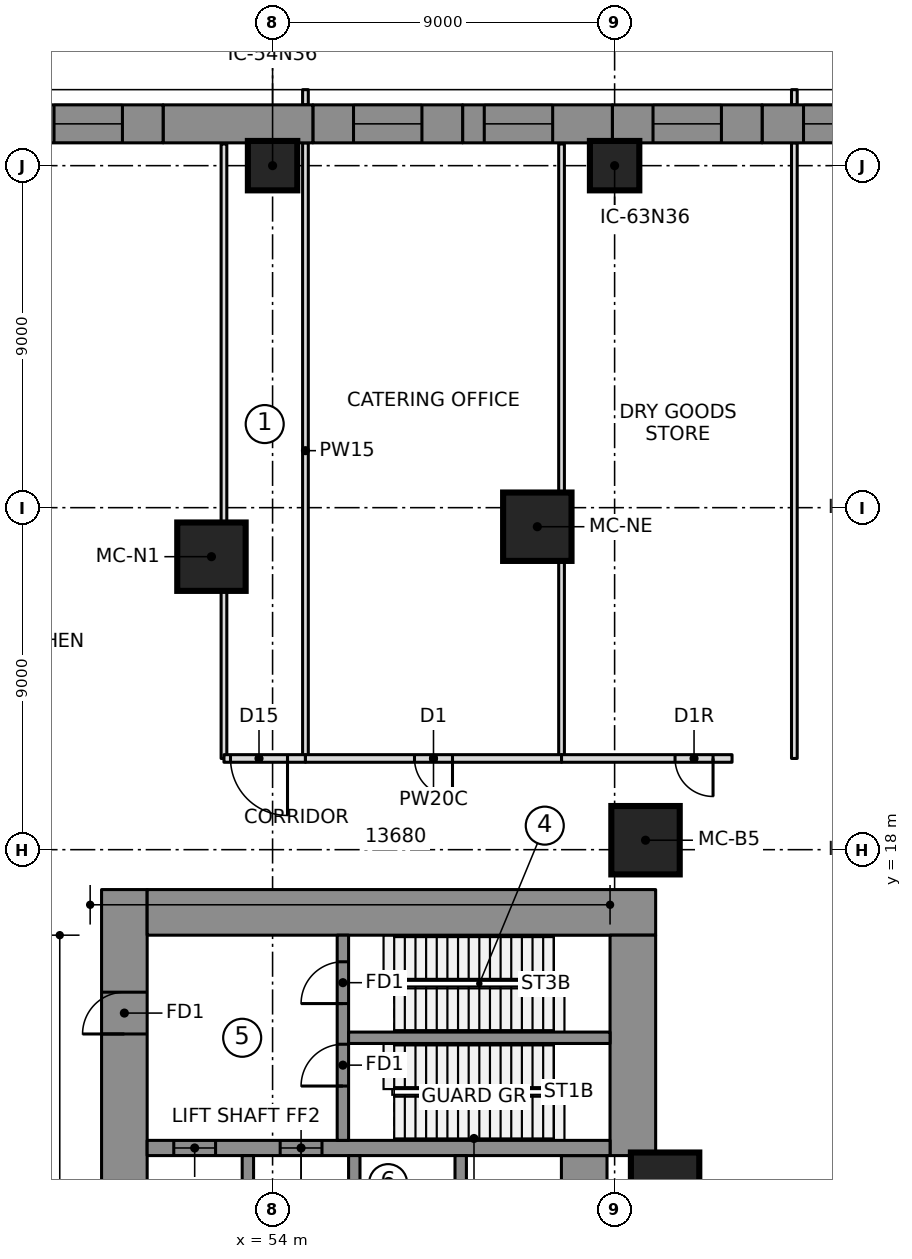
"""IFC4 building model, lengths in metres.
Left out: names, types, materials, properties, quantities, classifications, styles, units other than length and angle.
Written with IfcOpenShell. Run it as: python <this file> out.ifc"""

import sys

from ifc_helpers import new_model, si_unit, direction, frame, frame_2d, origin, origin_2d, place, context, subcontext, project, spatial, polyline, rectangle, outline, extrude, element, fill, save


model = new_model("IFC4")
c1 = context("Model", 3, precision=1e-05, world=origin(), true_north=direction((0.0, 1.0)))
c2 = subcontext(c1, "Body", "Model", "MODEL_VIEW")
j1 = project(units=[si_unit("LENGTHUNIT", "METRE"), si_unit("PLANEANGLEUNIT", "RADIAN")], contexts=[c1])
p1 = place(None, origin())
s1 = spatial("IfcSite", under=j1, at=p1, CompositionType="ELEMENT")
p2 = place(p1, origin())
s2 = spatial("IfcBuilding", under=s1, at=p2, CompositionType="ELEMENT")
p3 = place(p2, frame((0.0, 0.0, 13.5)))
s3 = spatial("IfcBuildingStorey", under=s2, at=p3, CompositionType="ELEMENT", Elevation=13.5)
p4 = place(p3, frame((50.1, 6.65, 0.0), z_axis=(0.0, 0.0, 1.0), x_axis=(0.0, 1.0, 0.0)))
e1 = element("IfcWall", 1, at=p4, inside=s3, PredefinedType="SHEAR", context=c2, shape_type="SweptSolid", body=[
    extrude(rectangle(XDim=10.3, YDim=1.2, at=frame_2d((5.15, 0.0))), origin(), (0.0, 0.0, 1.0), 5.5),
])
p5 = place(p4, frame((6.5, 0.0, 0.0)))
e2 = element("IfcOpeningElement", 2, at=p5, cuts=e1, PredefinedType="OPENING", context=c2, shape_type="SweptSolid", body=[
    extrude(rectangle(XDim=1.1, YDim=2.1, at=frame_2d((0.55, 1.05))), frame((0.0, 0.61, 0.0), z_axis=(0.0, -1.0, 0.0), x_axis=(1.0, 0.0, 0.0)), (0.0, 0.0, 1.0), 1.22),
])
p6 = place(p3, frame((50.7, 16.35, 0.0), z_axis=(0.0, 0.0, 1.0), x_axis=(1.0, 0.0, 0.0)))
e3 = element("IfcWall", 3, at=p6, inside=s3, PredefinedType="SHEAR", context=c2, shape_type="SweptSolid", body=[
    extrude(rectangle(XDim=13.38, YDim=1.2, at=frame_2d((6.69, 0.0))), origin(), (0.0, 0.0, 1.0), 5.5),
])
p7 = place(p3, frame((63.48, 9.95, 0.0), z_axis=(0.0, 0.0, 1.0), x_axis=(0.0, 1.0, 0.0)))
e4 = element("IfcWall", 4, at=p7, inside=s3, PredefinedType="SHEAR", context=c2, shape_type="SweptSolid", body=[
    extrude(rectangle(XDim=5.8, YDim=1.2, at=frame_2d((2.9, 0.0))), origin(), (0.0, 0.0, 1.0), 5.5),
])
p8 = place(p3, frame((62.2, -9.95, 0.0), z_axis=(0.0, 0.0, 1.0), x_axis=(0.0, 1.0, 0.0)))
e5 = element("IfcWall", 5, at=p8, inside=s3, PredefinedType="SHEAR", context=c2, shape_type="SweptSolid", body=[
    extrude(rectangle(XDim=19.9, YDim=1.2, at=frame_2d((9.95, 0.0))), origin(), (0.0, 0.0, 1.0), 5.5),
])
p9 = place(p3, frame((50.7, 10.15, 0.0), z_axis=(0.0, 0.0, 1.0), x_axis=(1.0, 0.0, 0.0)))
e6 = element("IfcWall", 6, at=p9, inside=s3, PredefinedType="SHEAR", context=c2, shape_type="SweptSolid", body=[
    extrude(rectangle(XDim=12.18, YDim=0.4, at=frame_2d((6.09, 0.0))), origin(), (0.0, 0.0, 1.0), 5.5),
])
p10 = place(p9, frame((0.7, 0.0, 0.0)))
e7 = element("IfcOpeningElement", 7, at=p10, cuts=e6, PredefinedType="OPENING", context=c2, shape_type="SweptSolid", body=[
    extrude(rectangle(XDim=1.1, YDim=2.1, at=frame_2d((0.55, 1.05))), frame((0.0, 0.21, 0.0), z_axis=(0.0, -1.0, 0.0), x_axis=(1.0, 0.0, 0.0)), (0.0, 0.0, 1.0), 0.42),
])
p11 = place(p9, frame((3.5, 0.0, 0.0)))
e8 = element("IfcOpeningElement", 8, at=p11, cuts=e6, PredefinedType="OPENING", context=c2, shape_type="SweptSolid", body=[
    extrude(rectangle(XDim=1.1, YDim=2.1, at=frame_2d((0.55, 1.05))), frame((0.0, 0.21, 0.0), z_axis=(0.0, -1.0, 0.0), x_axis=(1.0, 0.0, 0.0)), (0.0, 0.0, 1.0), 0.42),
])
for number, where, z_axis, x_axis in (
    (9, (53.35, 6.95, 0.0), (0.0, 0.0, 1.0), (0.0, 1.0, 0.0)),
    (10, (56.15, 6.95, 0.0), (0.0, 0.0, 1.0), (0.0, 1.0, 0.0)),
    (11, (58.95, 6.95, 0.0), (0.0, 0.0, 1.0), (0.0, 1.0, 0.0)),
):
    element("IfcWall", number, at=place(p3, frame(where, z_axis=z_axis, x_axis=x_axis)), inside=s3, PredefinedType="SHEAR", context=c2, shape_type="SweptSolid", body=[
        extrude(rectangle(XDim=3.0, YDim=0.3, at=frame_2d((1.5, 0.0))), origin(), (0.0, 0.0, 1.0), 5.5),
    ])
p12 = place(p3, frame((55.85, 10.35, 0.0), z_axis=(0.0, 0.0, 1.0), x_axis=(0.0, 1.0, 0.0)))
e12 = element("IfcWall", 12, at=p12, inside=s3, PredefinedType="SHEAR", context=c2, shape_type="SweptSolid", body=[
    extrude(rectangle(XDim=5.4, YDim=0.3, at=frame_2d((2.7, 0.0))), origin(), (0.0, 0.0, 1.0), 5.5),
])
p13 = place(p12, frame((1.43, 0.0, 0.0)))
e13 = element("IfcOpeningElement", 13, at=p13, cuts=e12, PredefinedType="OPENING", context=c2, shape_type="SweptSolid", body=[
    extrude(rectangle(XDim=1.1, YDim=2.1, at=frame_2d((0.55, 1.05))), frame((0.0, 0.16, 0.0), z_axis=(0.0, -1.0, 0.0), x_axis=(1.0, 0.0, 0.0)), (0.0, 0.0, 1.0), 0.32),
])
p14 = place(p12, frame((3.6, 0.0, 0.0)))
e14 = element("IfcOpeningElement", 14, at=p14, cuts=e12, PredefinedType="OPENING", context=c2, shape_type="SweptSolid", body=[
    extrude(rectangle(XDim=1.1, YDim=2.1, at=frame_2d((0.55, 1.05))), frame((0.0, 0.16, 0.0), z_axis=(0.0, -1.0, 0.0), x_axis=(1.0, 0.0, 0.0)), (0.0, 0.0, 1.0), 0.32),
])
p15 = place(p3, frame((56.0, 13.05, 0.0), z_axis=(0.0, 0.0, 1.0), x_axis=(1.0, 0.0, 0.0)))
e15 = element("IfcWall", 15, at=p15, inside=s3, PredefinedType="SHEAR", context=c2, shape_type="SweptSolid", body=[
    extrude(rectangle(XDim=6.88, YDim=0.3, at=frame_2d((3.44, 0.0))), origin(), (0.0, 0.0, 1.0), 5.5),
])
for number, where, z_axis, x_axis in (
    (16, (64.328, 9.131, 0.0), (0.0, 0.0, 1.0), (1.0, 0.0, 0.0)),
    (17, (63.813, 18.249, 0.0), (0.0, 0.0, 1.0), (1.0, 0.0, 0.0)),
    (18, (60.966, 26.499, 0.0), (0.0, 0.0, 1.0), (1.0, 0.0, 0.0)),
    (19, (52.392, 25.71, 0.0), (0.0, 0.0, 1.0), (1.0, 0.0, 0.0)),
):
    element("IfcColumn", number, at=place(p3, frame(where, z_axis=z_axis, x_axis=x_axis)), inside=s3, PredefinedType="COLUMN", context=c2, shape_type="SweptSolid", body=[
        extrude(rectangle(XDim=1.8, YDim=1.8, at=origin_2d()), origin(), (0.0, 0.0, 1.0), 5.5),
    ])
for number, where, z_axis, x_axis in (
    (20, (54.0, 36.0, 0.0), (0.0, 0.0, 1.0), (1.0, 0.0, 0.0)),
    (21, (63.0, 36.0, 0.0), (0.0, 0.0, 1.0), (1.0, 0.0, 0.0)),
):
    element("IfcColumn", number, at=place(p3, frame(where, z_axis=z_axis, x_axis=x_axis)), inside=s3, PredefinedType="COLUMN", context=c2, shape_type="SweptSolid", body=[
        extrude(rectangle(XDim=1.3, YDim=1.3, at=origin_2d()), origin(), (0.0, 0.0, 1.0), 5.5),
    ])
p16 = place(p3, frame((70.821, 37.1, 0.0), z_axis=(0.0, 0.0, 1.0), x_axis=(-1.0, 0.0, 0.0)))
e22 = element("IfcWall", 22, at=p16, inside=s3, PredefinedType="NOTDEFINED", context=c2, shape_type="SweptSolid", body=[
    extrude(outline(polyline([(-0.1, -0.5), (3.94, -0.5), (3.94, 0.5), (0.1, 0.5), (-0.1, -0.5)])), origin(), (0.0, 0.0, 1.0), 5.2),
])
p17 = place(p16, frame((1.05, 0.0, 0.9)))
e23 = element("IfcOpeningElement", 23, at=p17, cuts=e22, PredefinedType="OPENING", context=c2, shape_type="SweptSolid", body=[
    extrude(rectangle(XDim=1.8, YDim=2.4, at=frame_2d((0.9, 1.2))), frame((0.0, 0.51, 0.0), z_axis=(0.0, -1.0, 0.0), x_axis=(1.0, 0.0, 0.0)), (0.0, 0.0, 1.0), 1.02),
])
p18 = place(p3, frame((66.881, 37.1, 0.0), z_axis=(0.0, 0.0, 1.0), x_axis=(-1.0, 0.0, 0.0)))
e24 = element("IfcWall", 24, at=p18, inside=s3, PredefinedType="NOTDEFINED", context=c2, shape_type="SweptSolid", body=[
    extrude(outline(polyline([(0.0, -0.5), (3.94, -0.5), (3.94, 0.5), (0.0, 0.5), (0.0, -0.5)])), origin(), (0.0, 0.0, 1.0), 5.2),
])
p19 = place(p18, frame((1.07, 0.0, 0.9)))
e25 = element("IfcOpeningElement", 25, at=p19, cuts=e24, PredefinedType="OPENING", context=c2, shape_type="SweptSolid", body=[
    extrude(rectangle(XDim=1.8, YDim=2.4, at=frame_2d((0.9, 1.2))), frame((0.0, 0.51, 0.0), z_axis=(0.0, -1.0, 0.0), x_axis=(1.0, 0.0, 0.0)), (0.0, 0.0, 1.0), 1.02),
])
p20 = place(p3, frame((62.94, 37.1, 0.0), z_axis=(0.0, 0.0, 1.0), x_axis=(-1.0, 0.0, 0.0)))
e26 = element("IfcWall", 26, at=p20, inside=s3, PredefinedType="NOTDEFINED", context=c2, shape_type="SweptSolid", body=[
    extrude(outline(polyline([(0.0, -0.5), (3.94, -0.5), (3.94, 0.5), (0.0, 0.5), (0.0, -0.5)])), origin(), (0.0, 0.0, 1.0), 5.2),
])
p21 = place(p20, frame((1.57, 0.0, 0.9)))
e27 = element("IfcOpeningElement", 27, at=p21, cuts=e26, PredefinedType="OPENING", context=c2, shape_type="SweptSolid", body=[
    extrude(rectangle(XDim=1.8, YDim=2.4, at=frame_2d((0.9, 1.2))), frame((0.0, 0.51, 0.0), z_axis=(0.0, -1.0, 0.0), x_axis=(1.0, 0.0, 0.0)), (0.0, 0.0, 1.0), 1.02),
])
p22 = place(p3, frame((59.0, 37.1, 0.0), z_axis=(0.0, 0.0, 1.0), x_axis=(-1.0, 0.0, 0.0)))
e28 = element("IfcWall", 28, at=p22, inside=s3, PredefinedType="NOTDEFINED", context=c2, shape_type="SweptSolid", body=[
    extrude(outline(polyline([(0.0, -0.5), (3.94, -0.5), (3.94, 0.5), (0.0, 0.5), (0.0, -0.5)])), origin(), (0.0, 0.0, 1.0), 5.2),
])
p23 = place(p22, frame((1.07, 0.0, 0.9)))
e29 = element("IfcOpeningElement", 29, at=p23, cuts=e28, PredefinedType="OPENING", context=c2, shape_type="SweptSolid", body=[
    extrude(rectangle(XDim=1.8, YDim=2.4, at=frame_2d((0.9, 1.2))), frame((0.0, 0.51, 0.0), z_axis=(0.0, -1.0, 0.0), x_axis=(1.0, 0.0, 0.0)), (0.0, 0.0, 1.0), 1.02),
])
p24 = place(p3, frame((55.06, 37.1, 0.0), z_axis=(0.0, 0.0, 1.0), x_axis=(-1.0, 0.0, 0.0)))
e30 = element("IfcWall", 30, at=p24, inside=s3, PredefinedType="NOTDEFINED", context=c2, shape_type="SweptSolid", body=[
    extrude(outline(polyline([(0.0, -0.5), (3.94, -0.5), (3.94, 0.5), (0.0, 0.5), (0.0, -0.5)])), origin(), (0.0, 0.0, 1.0), 5.2),
])
p25 = place(p3, frame((51.119, 37.1, 0.0), z_axis=(0.0, 0.0, 1.0), x_axis=(-1.0, 0.0, 0.0)))
e31 = element("IfcWall", 31, at=p25, inside=s3, PredefinedType="NOTDEFINED", context=c2, shape_type="SweptSolid", body=[
    extrude(outline(polyline([(0.0, -0.5), (4.04, -0.5), (3.841, 0.5), (0.0, 0.5), (0.0, -0.5)])), origin(), (0.0, 0.0, 1.0), 5.2),
])
p26 = place(p25, frame((1.07, 0.0, 0.9)))
e32 = element("IfcOpeningElement", 32, at=p26, cuts=e31, PredefinedType="OPENING", context=c2, shape_type="SweptSolid", body=[
    extrude(rectangle(XDim=1.8, YDim=2.4, at=frame_2d((0.9, 1.2))), frame((0.0, 0.51, 0.0), z_axis=(0.0, -1.0, 0.0), x_axis=(1.0, 0.0, 0.0)), (0.0, 0.0, 1.0), 1.02),
])
p27 = place(p3, frame((52.721, 20.4, 0.0), z_axis=(0.0, 0.0, 1.0), x_axis=(0.0, 1.0, 0.0)))
e33 = element("IfcWall", 33, at=p27, inside=s3, PredefinedType="PARTITIONING", context=c2, shape_type="SweptSolid", body=[
    extrude(rectangle(XDim=16.17, YDim=0.15, at=frame_2d((8.085, 0.0))), origin(), (0.0, 0.0, 1.0), 5.15),
])
p28 = place(p3, frame((54.865, 20.4, 0.0), z_axis=(0.0, 0.0, 1.0), x_axis=(0.0, 1.0, 0.0)))
e34 = element("IfcWall", 34, at=p28, inside=s3, PredefinedType="PARTITIONING", context=c2, shape_type="SweptSolid", body=[
    extrude(rectangle(XDim=16.2, YDim=0.15, at=frame_2d((8.1, 0.0))), origin(), (0.0, 0.0, 1.0), 5.15),
])
p29 = place(p3, frame((54.865, 37.6, 0.0), z_axis=(0.0, 0.0, 1.0), x_axis=(0.0, 1.0, 0.0)))
e35 = element("IfcWall", 35, at=p29, inside=s3, PredefinedType="PARTITIONING", context=c2, shape_type="SweptSolid", body=[
    extrude(rectangle(XDim=0.4, YDim=0.15, at=frame_2d((0.2, 0.0))), origin(), (0.0, 0.0, 1.0), 5.15),
])
p30 = place(p3, frame((61.604, 20.4, 0.0), z_axis=(0.0, 0.0, 1.0), x_axis=(0.0, 1.0, 0.0)))
e36 = element("IfcWall", 36, at=p30, inside=s3, PredefinedType="PARTITIONING", context=c2, shape_type="SweptSolid", body=[
    extrude(rectangle(XDim=16.17, YDim=0.15, at=frame_2d((8.085, 0.0))), origin(), (0.0, 0.0, 1.0), 5.15),
])
p31 = place(p3, frame((67.73, 20.4, 0.0), z_axis=(0.0, 0.0, 1.0), x_axis=(0.0, 1.0, 0.0)))
e37 = element("IfcWall", 37, at=p31, inside=s3, PredefinedType="PARTITIONING", context=c2, shape_type="SweptSolid", body=[
    extrude(rectangle(XDim=16.2, YDim=0.15, at=frame_2d((8.1, 0.0))), origin(), (0.0, 0.0, 1.0), 5.15),
])
p32 = place(p3, frame((67.73, 37.6, 0.0), z_axis=(0.0, 0.0, 1.0), x_axis=(0.0, 1.0, 0.0)))
e38 = element("IfcWall", 38, at=p32, inside=s3, PredefinedType="PARTITIONING", context=c2, shape_type="SweptSolid", body=[
    extrude(rectangle(XDim=0.4, YDim=0.15, at=frame_2d((0.2, 0.0))), origin(), (0.0, 0.0, 1.0), 5.15),
])
p33 = place(p3, frame((54.865, 20.4, 0.0), z_axis=(0.0, 0.0, 1.0), x_axis=(-1.0, 0.0, 0.0)))
e39 = element("IfcWall", 39, at=p33, inside=s3, PredefinedType="PARTITIONING", context=c2, shape_type="SweptSolid", body=[
    extrude(rectangle(XDim=2.144, YDim=0.2, at=frame_2d((1.072, 0.0))), origin(), (0.0, 0.0, 1.0), 5.15),
])
p34 = place(p33, frame((0.472, 0.0, 0.0)))
e40 = element("IfcOpeningElement", 40, at=p34, cuts=e39, PredefinedType="OPENING", context=c2, shape_type="SweptSolid", body=[
    extrude(rectangle(XDim=1.5, YDim=2.1, at=frame_2d((0.75, 1.05))), frame((0.0, 0.11, 0.0), z_axis=(0.0, -1.0, 0.0), x_axis=(1.0, 0.0, 0.0)), (0.0, 0.0, 1.0), 0.22),
])
p35 = place(p3, frame((61.604, 20.4, 0.0), z_axis=(0.0, 0.0, 1.0), x_axis=(-1.0, 0.0, 0.0)))
e41 = element("IfcWall", 41, at=p35, inside=s3, PredefinedType="PARTITIONING", context=c2, shape_type="SweptSolid", body=[
    extrude(rectangle(XDim=6.739, YDim=0.2, at=frame_2d((3.369, 0.0))), origin(), (0.0, 0.0, 1.0), 5.15),
])
p36 = place(p35, frame((2.869, 0.0, 0.0)))
e42 = element("IfcOpeningElement", 42, at=p36, cuts=e41, PredefinedType="OPENING", context=c2, shape_type="SweptSolid", body=[
    extrude(rectangle(XDim=1.0, YDim=2.1, at=frame_2d((0.5, 1.05))), frame((0.0, 0.11, 0.0), z_axis=(0.0, -1.0, 0.0), x_axis=(1.0, 0.0, 0.0)), (0.0, 0.0, 1.0), 0.22),
])
p37 = place(p3, frame((66.09, 20.4, 0.0), z_axis=(0.0, 0.0, 1.0), x_axis=(-1.0, 0.0, 0.0)))
e43 = element("IfcWall", 43, at=p37, inside=s3, PredefinedType="PARTITIONING", context=c2, shape_type="SweptSolid", body=[
    extrude(rectangle(XDim=4.487, YDim=0.2, at=frame_2d((2.243, 0.0))), origin(), (0.0, 0.0, 1.0), 5.15),
])
p38 = place(p37, frame((0.5, 0.0, 0.0)))
e44 = element("IfcOpeningElement", 44, at=p38, cuts=e43, PredefinedType="OPENING", context=c2, shape_type="SweptSolid", body=[
    extrude(rectangle(XDim=1.0, YDim=2.1, at=frame_2d((0.5, 1.05))), frame((0.0, 0.11, 0.0), z_axis=(0.0, -1.0, 0.0), x_axis=(1.0, 0.0, 0.0)), (0.0, 0.0, 1.0), 0.22),
])
p39 = place(p17, origin())
e45 = element("IfcWindow", 45, at=p39, inside=s3, PartitioningType="SINGLE_PANEL", PredefinedType="WINDOW", context=c2, shape_type="SweptSolid", body=[
    extrude(rectangle(XDim=1.8, YDim=2.4, at=frame_2d((0.9, 1.2))), frame((0.0, 0.5, 0.0), z_axis=(0.0, -1.0, 0.0), x_axis=(1.0, 0.0, 0.0)), (0.0, 0.0, 1.0), 0.06),
])
fill(e23, e45)
p40 = place(p19, origin())
e46 = element("IfcWindow", 46, at=p40, inside=s3, PartitioningType="SINGLE_PANEL", PredefinedType="WINDOW", context=c2, shape_type="SweptSolid", body=[
    extrude(rectangle(XDim=1.8, YDim=2.4, at=frame_2d((0.9, 1.2))), frame((0.0, 0.5, 0.0), z_axis=(0.0, -1.0, 0.0), x_axis=(1.0, 0.0, 0.0)), (0.0, 0.0, 1.0), 0.06),
])
fill(e25, e46)
p41 = place(p21, origin())
e47 = element("IfcWindow", 47, at=p41, inside=s3, PartitioningType="SINGLE_PANEL", PredefinedType="WINDOW", context=c2, shape_type="SweptSolid", body=[
    extrude(rectangle(XDim=1.8, YDim=2.4, at=frame_2d((0.9, 1.2))), frame((0.0, 0.5, 0.0), z_axis=(0.0, -1.0, 0.0), x_axis=(1.0, 0.0, 0.0)), (0.0, 0.0, 1.0), 0.06),
])
fill(e27, e47)
p42 = place(p23, origin())
e48 = element("IfcWindow", 48, at=p42, inside=s3, PartitioningType="SINGLE_PANEL", PredefinedType="WINDOW", context=c2, shape_type="SweptSolid", body=[
    extrude(rectangle(XDim=1.8, YDim=2.4, at=frame_2d((0.9, 1.2))), frame((0.0, 0.5, 0.0), z_axis=(0.0, -1.0, 0.0), x_axis=(1.0, 0.0, 0.0)), (0.0, 0.0, 1.0), 0.06),
])
fill(e29, e48)
p43 = place(p26, origin())
e49 = element("IfcWindow", 49, at=p43, inside=s3, PartitioningType="SINGLE_PANEL", PredefinedType="WINDOW", context=c2, shape_type="SweptSolid", body=[
    extrude(rectangle(XDim=1.8, YDim=2.4, at=frame_2d((0.9, 1.2))), frame((0.0, 0.5, 0.0), z_axis=(0.0, -1.0, 0.0), x_axis=(1.0, 0.0, 0.0)), (0.0, 0.0, 1.0), 0.06),
])
fill(e32, e49)
p44 = place(p34, origin())
e50 = element("IfcDoor", 50, at=p44, inside=s3, OperationType="DOUBLE_DOOR_SINGLE_SWING", PredefinedType="DOOR", context=c2, shape_type="SweptSolid", body=[
    extrude(rectangle(XDim=1.5, YDim=2.1, at=frame_2d((0.75, 1.05))), frame((0.0, 0.025, 0.0), z_axis=(0.0, -1.0, 0.0), x_axis=(1.0, 0.0, 0.0)), (0.0, 0.0, 1.0), 0.05),
])
fill(e40, e50)
p45 = place(p36, origin())
e51 = element("IfcDoor", 51, at=p45, inside=s3, OperationType="SINGLE_SWING_LEFT", PredefinedType="DOOR", context=c2, shape_type="SweptSolid", body=[
    extrude(rectangle(XDim=1.0, YDim=2.1, at=frame_2d((0.5, 1.05))), frame((0.0, 0.025, 0.0), z_axis=(0.0, -1.0, 0.0), x_axis=(1.0, 0.0, 0.0)), (0.0, 0.0, 1.0), 0.05),
])
fill(e42, e51)
p46 = place(p38, origin())
e52 = element("IfcDoor", 52, at=p46, inside=s3, OperationType="SINGLE_SWING_RIGHT", PredefinedType="DOOR", context=c2, shape_type="SweptSolid", body=[
    extrude(rectangle(XDim=1.0, YDim=2.1, at=frame_2d((0.5, 1.05))), frame((0.0, 0.025, 0.0), z_axis=(0.0, -1.0, 0.0), x_axis=(1.0, 0.0, 0.0)), (0.0, 0.0, 1.0), 0.05),
])
fill(e44, e52)
p47 = place(p10, origin())
e53 = element("IfcDoor", 53, at=p47, inside=s3, OperationType="DOUBLE_DOOR_SLIDING", PredefinedType="DOOR", context=c2, shape_type="SweptSolid", body=[
    extrude(rectangle(XDim=1.1, YDim=2.1, at=frame_2d((0.55, 1.05))), frame((0.0, 0.025, 0.0), z_axis=(0.0, -1.0, 0.0), x_axis=(1.0, 0.0, 0.0)), (0.0, 0.0, 1.0), 0.05),
])
fill(e7, e53)
p48 = place(p11, origin())
e54 = element("IfcDoor", 54, at=p48, inside=s3, OperationType="DOUBLE_DOOR_SLIDING", PredefinedType="DOOR", context=c2, shape_type="SweptSolid", body=[
    extrude(rectangle(XDim=1.1, YDim=2.1, at=frame_2d((0.55, 1.05))), frame((0.0, 0.025, 0.0), z_axis=(0.0, -1.0, 0.0), x_axis=(1.0, 0.0, 0.0)), (0.0, 0.0, 1.0), 0.05),
])
fill(e8, e54)
p49 = place(p13, origin())
e55 = element("IfcDoor", 55, at=p49, inside=s3, OperationType="SINGLE_SWING_RIGHT", PredefinedType="DOOR", context=c2, shape_type="SweptSolid", body=[
    extrude(rectangle(XDim=1.1, YDim=2.1, at=frame_2d((0.55, 1.05))), frame((0.0, 0.025, 0.0), z_axis=(0.0, -1.0, 0.0), x_axis=(1.0, 0.0, 0.0)), (0.0, 0.0, 1.0), 0.05),
])
fill(e13, e55)
p50 = place(p14, origin())
e56 = element("IfcDoor", 56, at=p50, inside=s3, OperationType="SINGLE_SWING_RIGHT", PredefinedType="DOOR", context=c2, shape_type="SweptSolid", body=[
    extrude(rectangle(XDim=1.1, YDim=2.1, at=frame_2d((0.55, 1.05))), frame((0.0, 0.025, 0.0), z_axis=(0.0, -1.0, 0.0), x_axis=(1.0, 0.0, 0.0)), (0.0, 0.0, 1.0), 0.05),
])
fill(e14, e56)
p51 = place(p5, origin())
e57 = element("IfcDoor", 57, at=p51, inside=s3, OperationType="SINGLE_SWING_RIGHT", PredefinedType="DOOR", context=c2, shape_type="SweptSolid", body=[
    extrude(rectangle(XDim=1.1, YDim=2.1, at=frame_2d((0.55, 1.05))), frame((0.0, 0.025, 0.0), z_axis=(0.0, -1.0, 0.0), x_axis=(1.0, 0.0, 0.0)), (0.0, 0.0, 1.0), 0.05),
])
fill(e2, e57)
save(model, sys.argv[1])
